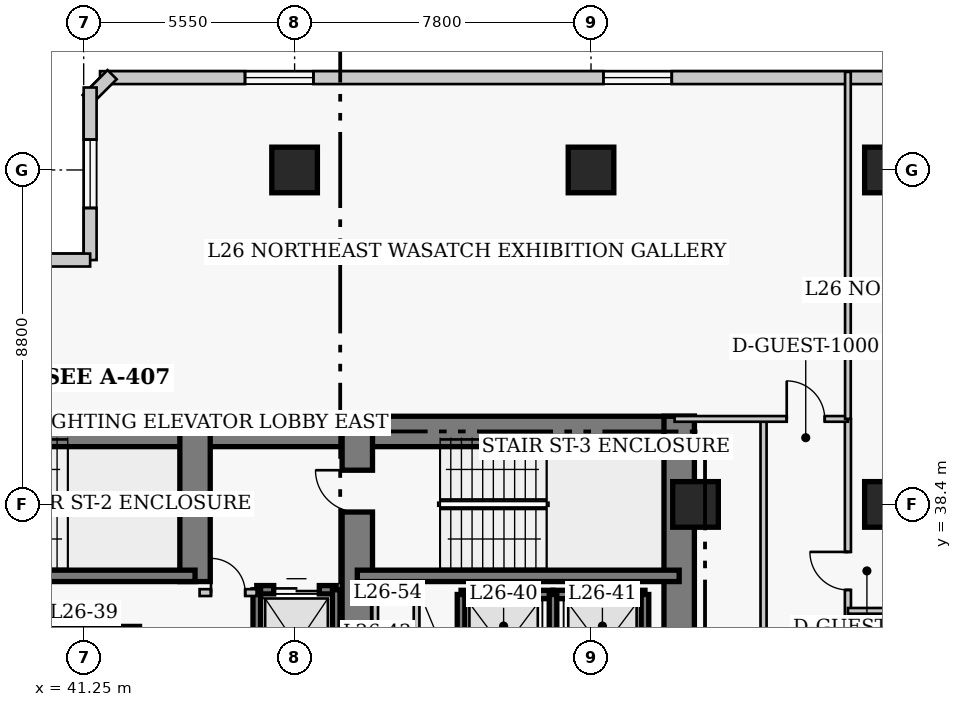
"""IFC4 building model, lengths in metres.
Left out: names, types, materials, properties, quantities, classifications, styles, units other than length and angle.
Written with IfcOpenShell. Run it as: python <this file> out.ifc"""

import sys

from ifc_helpers import new_model, si_unit, direction, frame, frame_2d, origin, origin_2d, place, context, subcontext, project, spatial, rectangle, extrude, element, fill, save


model = new_model("IFC4")
c1 = context("Model", 3, precision=1e-05, world=origin(), true_north=direction((0.0, 1.0)))
c2 = subcontext(c1, "Body", "Model", "MODEL_VIEW")
j1 = project(units=[si_unit("LENGTHUNIT", "METRE"), si_unit("PLANEANGLEUNIT", "RADIAN")], contexts=[c1])
p1 = place(None, origin())
s1 = spatial("IfcSite", under=j1, at=p1, CompositionType="ELEMENT")
p2 = place(p1, origin())
s2 = spatial("IfcBuilding", under=s1, at=p2, CompositionType="ELEMENT")
p3 = place(p2, frame((0.0, 0.0, 107.0)))
s3 = spatial("IfcBuildingStorey", under=s2, at=p3, CompositionType="ELEMENT", Elevation=107.0)
p4 = place(p3, frame((35.85, 40.32, 0.0), z_axis=(0.0, 0.0, 1.0), x_axis=(1.0, 0.0, 0.0)))
e1 = element("IfcWall", 1, at=p4, inside=s3, PredefinedType="SHEAR", context=c2, shape_type="SweptSolid", body=[
    extrude(rectangle(XDim=12.6, YDim=0.8, at=frame_2d((6.3, 0.0))), origin(), (0.0, 0.0, 1.0), 3.8),
])
p5 = place(p3, frame((48.45, 40.32, 0.0), z_axis=(0.0, 0.0, 1.0), x_axis=(1.0, 0.0, 0.0)))
e2 = element("IfcWall", 2, at=p5, inside=s3, PredefinedType="SHEAR", context=c2, shape_type="SweptSolid", body=[
    extrude(rectangle(XDim=8.87, YDim=0.8, at=frame_2d((4.435, 0.0))), origin(), (0.0, 0.0, 1.0), 3.8),
])
p6 = place(p3, frame((56.92, 27.05, 0.0), z_axis=(0.0, 0.0, 1.0), x_axis=(0.0, 1.0, 0.0)))
e3 = element("IfcWall", 3, at=p6, inside=s3, PredefinedType="SHEAR", context=c2, shape_type="SweptSolid", body=[
    extrude(rectangle(XDim=13.67, YDim=0.8, at=frame_2d((6.835, 0.0))), origin(), (0.0, 0.0, 1.0), 3.8),
])
p7 = place(p3, frame((44.18, 36.37, 0.0), z_axis=(0.0, 0.0, 1.0), x_axis=(0.0, 1.0, 0.0)))
e4 = element("IfcWall", 4, at=p7, inside=s3, PredefinedType="SHEAR", context=c2, shape_type="SweptSolid", body=[
    extrude(rectangle(XDim=3.95, YDim=0.8, at=frame_2d((1.975, 0.0))), origin(), (0.0, 0.0, 1.0), 3.8),
])
p8 = place(p3, frame((48.45, 32.35, 0.0), z_axis=(0.0, 0.0, 1.0), x_axis=(0.0, 1.0, 0.0)))
e5 = element("IfcWall", 5, at=p8, inside=s3, PredefinedType="SHEAR", context=c2, shape_type="SweptSolid", body=[
    extrude(rectangle(XDim=7.97, YDim=0.8, at=frame_2d((3.985, 0.0))), origin(), (0.0, 0.0, 1.0), 3.8),
])
p9 = place(p8, frame((5.85, 0.0, 0.0)))
e6 = element("IfcOpeningElement", 6, at=p9, cuts=e5, PredefinedType="OPENING", context=c2, shape_type="SweptSolid", body=[
    extrude(rectangle(XDim=1.1, YDim=2.15, at=frame_2d((0.55, 1.075))), frame((0.0, 0.41, 0.0), z_axis=(0.0, -1.0, 0.0), x_axis=(1.0, 0.0, 0.0)), (0.0, 0.0, 1.0), 0.82),
])
p10 = place(p3, frame((35.85, 36.52, 0.0), z_axis=(0.0, 0.0, 1.0), x_axis=(1.0, 0.0, 0.0)))
e7 = element("IfcWall", 7, at=p10, inside=s3, PredefinedType="SHEAR", context=c2, shape_type="SweptSolid", body=[
    extrude(rectangle(XDim=8.33, YDim=0.3, at=frame_2d((4.165, 0.0))), origin(), (0.0, 0.0, 1.0), 3.8),
])
p11 = place(p3, frame((48.45, 36.52, 0.0), z_axis=(0.0, 0.0, 1.0), x_axis=(1.0, 0.0, 0.0)))
e8 = element("IfcWall", 8, at=p11, inside=s3, PredefinedType="SHEAR", context=c2, shape_type="SweptSolid", body=[
    extrude(rectangle(XDim=8.47, YDim=0.3, at=frame_2d((4.235, 0.0))), origin(), (0.0, 0.0, 1.0), 3.8),
])
for number, where, z_axis, x_axis in (
    (9, (46.8, 47.2, 0.0), (0.0, 0.0, 1.0), (1.0, 0.0, 0.0)),
    (10, (54.6, 47.2, 0.0), (0.0, 0.0, 1.0), (1.0, 0.0, 0.0)),
    (11, (62.4, 38.4, 0.0), (0.0, 0.0, 1.0), (1.0, 0.0, 0.0)),
    (12, (62.4, 47.2, 0.0), (0.0, 0.0, 1.0), (1.0, 0.0, 0.0)),
    (13, (57.35, 38.4, 0.0), (0.0, 0.0, 1.0), (1.0, 0.0, 0.0)),
):
    element("IfcColumn", number, at=place(p3, frame(where, z_axis=z_axis, x_axis=x_axis)), inside=s3, PredefinedType="COLUMN", context=c2, shape_type="SweptSolid", body=[
        extrude(rectangle(XDim=1.2, YDim=1.2, at=origin_2d()), origin(), (0.0, 0.0, 1.0), 3.8),
    ])
p12 = place(p3, frame((69.97, 49.63, 0.0), z_axis=(0.0, 0.0, 1.0), x_axis=(-1.0, 0.0, 0.0)))
e14 = element("IfcWall", 14, at=p12, inside=s3, PredefinedType="SOLIDWALL", context=c2, shape_type="SweptSolid", body=[
    extrude(rectangle(XDim=28.29, YDim=0.34, at=frame_2d((14.145, 0.0))), origin(), (0.0, 0.0, 1.0), 3.54),
])
p13 = place(p12, frame((3.815, 0.0, 0.85)))
e15 = element("IfcOpeningElement", 15, at=p13, cuts=e14, PredefinedType="OPENING", context=c2, shape_type="SweptSolid", body=[
    extrude(rectangle(XDim=1.8, YDim=1.8, at=frame_2d((0.9, 0.9))), frame((0.0, 0.18, 0.0), z_axis=(0.0, -1.0, 0.0), x_axis=(1.0, 0.0, 0.0)), (0.0, 0.0, 1.0), 0.36),
])
p14 = place(p12, frame((13.245, 0.0, 0.85)))
e16 = element("IfcOpeningElement", 16, at=p14, cuts=e14, PredefinedType="OPENING", context=c2, shape_type="SweptSolid", body=[
    extrude(rectangle(XDim=1.8, YDim=1.8, at=frame_2d((0.9, 0.9))), frame((0.0, 0.18, 0.0), z_axis=(0.0, -1.0, 0.0), x_axis=(1.0, 0.0, 0.0)), (0.0, 0.0, 1.0), 0.36),
])
p15 = place(p12, frame((22.675, 0.0, 0.85)))
e17 = element("IfcOpeningElement", 17, at=p15, cuts=e14, PredefinedType="OPENING", context=c2, shape_type="SweptSolid", body=[
    extrude(rectangle(XDim=1.8, YDim=1.8, at=frame_2d((0.9, 0.9))), frame((0.0, 0.18, 0.0), z_axis=(0.0, -1.0, 0.0), x_axis=(1.0, 0.0, 0.0)), (0.0, 0.0, 1.0), 0.36),
])
p16 = place(p3, frame((41.999, 49.708, 0.0), z_axis=(0.0, 0.0, 1.0), x_axis=(-0.707238225886, -0.706975312048, 0.0)))
e18 = element("IfcWall", 18, at=p16, inside=s3, PredefinedType="SOLIDWALL", context=c2, shape_type="SweptSolid", body=[
    extrude(rectangle(XDim=0.929, YDim=0.34, at=frame_2d((0.464, 0.0))), origin(), (0.0, 0.0, 1.0), 3.54),
])
p17 = place(p3, frame((41.42, 49.37, 0.0), z_axis=(0.0, 0.0, 1.0), x_axis=(0.0, -1.0, 0.0)))
e19 = element("IfcWall", 19, at=p17, inside=s3, PredefinedType="SOLIDWALL", context=c2, shape_type="SweptSolid", body=[
    extrude(rectangle(XDim=4.54, YDim=0.34, at=frame_2d((2.27, 0.0))), origin(), (0.0, 0.0, 1.0), 3.54),
])
p18 = place(p17, frame((1.37, 0.0, 0.85)))
e20 = element("IfcOpeningElement", 20, at=p18, cuts=e19, PredefinedType="OPENING", context=c2, shape_type="SweptSolid", body=[
    extrude(rectangle(XDim=1.8, YDim=1.8, at=frame_2d((0.9, 0.9))), frame((0.0, 0.18, 0.0), z_axis=(0.0, -1.0, 0.0), x_axis=(1.0, 0.0, 0.0)), (0.0, 0.0, 1.0), 0.36),
])
p19 = place(p3, frame((41.42, 44.83, 0.0), z_axis=(0.0, 0.0, 1.0), x_axis=(-1.0, 0.0, 0.0)))
e21 = element("IfcWall", 21, at=p19, inside=s3, PredefinedType="SOLIDWALL", context=c2, shape_type="SweptSolid", body=[
    extrude(rectangle(XDim=4.84, YDim=0.34, at=frame_2d((2.42, 0.0))), origin(), (0.0, 0.0, 1.0), 3.54),
])
p20 = place(p19, frame((1.52, 0.0, 0.85)))
e22 = element("IfcOpeningElement", 22, at=p20, cuts=e21, PredefinedType="OPENING", context=c2, shape_type="SweptSolid", body=[
    extrude(rectangle(XDim=1.8, YDim=1.8, at=frame_2d((0.9, 0.9))), frame((0.0, 0.18, 0.0), z_axis=(0.0, -1.0, 0.0), x_axis=(1.0, 0.0, 0.0)), (0.0, 0.0, 1.0), 0.36),
])
p21 = place(p3, frame((40.4, 35.08, 0.0), z_axis=(0.0, 0.0, 1.0), x_axis=(1.0, 0.0, 0.0)))
e23 = element("IfcWall", 23, at=p21, inside=s3, PredefinedType="SHEAR", context=c2, shape_type="SweptSolid", body=[
    extrude(rectangle(XDim=2.32, YDim=0.22, at=frame_2d((1.16, 0.0))), origin(), (0.0, 0.0, 1.0), 3.8),
])
p22 = place(p3, frame((51.18, 36.03, 0.0), z_axis=(0.0, 0.0, 1.0), x_axis=(1.0, 0.0, 0.0)))
e24 = element("IfcWall", 24, at=p22, inside=s3, PredefinedType="SHEAR", context=c2, shape_type="SweptSolid", body=[
    extrude(rectangle(XDim=2.42, YDim=0.22, at=frame_2d((1.21, 0.0))), origin(), (0.0, 0.0, 1.0), 3.8),
])
p23 = place(p3, frame((51.18, 33.17, 0.0), z_axis=(0.0, 0.0, 1.0), x_axis=(0.0, 1.0, 0.0)))
e25 = element("IfcWall", 25, at=p23, inside=s3, PredefinedType="SHEAR", context=c2, shape_type="SweptSolid", body=[
    extrude(rectangle(XDim=2.86, YDim=0.2, at=frame_2d((1.43, 0.0))), origin(), (0.0, 0.0, 1.0), 3.8),
])
p24 = place(p3, frame((53.6, 36.03, 0.0), z_axis=(0.0, 0.0, 1.0), x_axis=(1.0, 0.0, 0.0)))
e26 = element("IfcWall", 26, at=p24, inside=s3, PredefinedType="SHEAR", context=c2, shape_type="SweptSolid", body=[
    extrude(rectangle(XDim=2.42, YDim=0.22, at=frame_2d((1.21, 0.0))), origin(), (0.0, 0.0, 1.0), 3.8),
])
for number, where, z_axis, x_axis in (
    (27, (53.6, 33.17, 0.0), (0.0, 0.0, 1.0), (0.0, 1.0, 0.0)),
    (28, (56.02, 33.17, 0.0), (0.0, 0.0, 1.0), (0.0, 1.0, 0.0)),
):
    element("IfcWall", number, at=place(p3, frame(where, z_axis=z_axis, x_axis=x_axis)), inside=s3, PredefinedType="SHEAR", context=c2, shape_type="SweptSolid", body=[
        extrude(rectangle(XDim=2.86, YDim=0.2, at=frame_2d((1.43, 0.0))), origin(), (0.0, 0.0, 1.0), 3.8),
    ])
p25 = place(p3, frame((45.805, 36.155, 0.0), z_axis=(0.0, 0.0, 1.0), x_axis=(1.0, 0.0, 0.0)))
e29 = element("IfcWall", 29, at=p25, inside=s3, PredefinedType="SHEAR", context=c2, shape_type="SweptSolid", body=[
    extrude(rectangle(XDim=2.09, YDim=0.22, at=frame_2d((1.045, 0.0))), origin(), (0.0, 0.0, 1.0), 3.8),
])
p26 = place(p25, frame((0.445, 0.0, 0.0)))
e30 = element("IfcOpeningElement", 30, at=p26, cuts=e29, PredefinedType="OPENING", context=c2, shape_type="SweptSolid", body=[
    extrude(rectangle(XDim=1.2, YDim=2.15, at=frame_2d((0.6, 1.075))), frame((0.0, 0.12, 0.0), z_axis=(0.0, -1.0, 0.0), x_axis=(1.0, 0.0, 0.0)), (0.0, 0.0, 1.0), 0.24),
])
p27 = place(p3, frame((45.805, 32.65, 0.0), z_axis=(0.0, 0.0, 1.0), x_axis=(0.0, 1.0, 0.0)))
e31 = element("IfcWall", 31, at=p27, inside=s3, PredefinedType="SHEAR", context=c2, shape_type="SweptSolid", body=[
    extrude(rectangle(XDim=3.505, YDim=0.2, at=frame_2d((1.752, 0.0))), origin(), (0.0, 0.0, 1.0), 3.8),
])
p28 = place(p3, frame((47.895, 33.245, 0.0), z_axis=(0.0, 0.0, 1.0), x_axis=(0.0, 1.0, 0.0)))
e32 = element("IfcWall", 32, at=p28, inside=s3, PredefinedType="SHEAR", context=c2, shape_type="SweptSolid", body=[
    extrude(rectangle(XDim=2.91, YDim=0.2, at=frame_2d((1.455, 0.0))), origin(), (0.0, 0.0, 1.0), 3.8),
])
p29 = place(p3, frame((44.3, 36.08, 0.0), z_axis=(0.0, 0.0, 1.0), x_axis=(1.0, 0.0, 0.0)))
e33 = element("IfcWall", 33, at=p29, inside=s3, PredefinedType="PARTITIONING", context=c2, shape_type="SweptSolid", body=[
    extrude(rectangle(XDim=1.5, YDim=0.18, at=frame_2d((0.75, 0.0))), origin(), (0.0, 0.0, 1.0), 3.54),
])
p30 = place(p29, frame((0.3, 0.0, 0.0)))
e34 = element("IfcOpeningElement", 34, at=p30, cuts=e33, PredefinedType="OPENING", context=c2, shape_type="SweptSolid", body=[
    extrude(rectangle(XDim=0.9, YDim=2.15, at=frame_2d((0.45, 1.075))), frame((0.0, 0.1, 0.0), z_axis=(0.0, -1.0, 0.0), x_axis=(1.0, 0.0, 0.0)), (0.0, 0.0, 1.0), 0.2),
])
for number, where, z_axis, x_axis in (
    (35, (48.92, 32.75, 0.0), (0.0, 0.0, 1.0), (0.0, 1.0, 0.0)),
    (36, (50.01, 32.75, 0.0), (0.0, 0.0, 1.0), (0.0, 1.0, 0.0)),
):
    element("IfcWall", number, at=place(p3, frame(where, z_axis=z_axis, x_axis=x_axis)), inside=s3, PredefinedType="PARTITIONING", context=c2, shape_type="SweptSolid", body=[
        extrude(rectangle(XDim=3.62, YDim=0.15, at=frame_2d((1.81, 0.0))), origin(), (0.0, 0.0, 1.0), 3.54),
    ])
p31 = place(p3, frame((61.36, 11.85, 0.0), z_axis=(0.0, 0.0, 1.0), x_axis=(0.0, 1.0, 0.0)))
e37 = element("IfcWall", 37, at=p31, inside=s3, PredefinedType="PARTITIONING", context=c2, shape_type="SweptSolid", body=[
    extrude(rectangle(XDim=28.8, YDim=0.16, at=frame_2d((14.4, 0.0))), origin(), (0.0, 0.0, 1.0), 3.54),
])
p32 = place(p31, frame((3.6, 0.0, 0.0)))
e38 = element("IfcOpeningElement", 38, at=p32, cuts=e37, PredefinedType="OPENING", context=c2, shape_type="SweptSolid", body=[
    extrude(rectangle(XDim=0.95, YDim=2.1, at=frame_2d((0.475, 1.05))), frame((0.0, 0.09, 0.0), z_axis=(0.0, -1.0, 0.0), x_axis=(1.0, 0.0, 0.0)), (0.0, 0.0, 1.0), 0.18),
])
p33 = place(p31, frame((12.075, 0.0, 0.0)))
e39 = element("IfcOpeningElement", 39, at=p33, cuts=e37, PredefinedType="OPENING", context=c2, shape_type="SweptSolid", body=[
    extrude(rectangle(XDim=0.95, YDim=2.1, at=frame_2d((0.475, 1.05))), frame((0.0, 0.09, 0.0), z_axis=(0.0, -1.0, 0.0), x_axis=(1.0, 0.0, 0.0)), (0.0, 0.0, 1.0), 0.18),
])
p34 = place(p31, frame((19.875, 0.0, 0.0)))
e40 = element("IfcOpeningElement", 40, at=p34, cuts=e37, PredefinedType="OPENING", context=c2, shape_type="SweptSolid", body=[
    extrude(rectangle(XDim=0.95, YDim=2.1, at=frame_2d((0.475, 1.05))), frame((0.0, 0.09, 0.0), z_axis=(0.0, -1.0, 0.0), x_axis=(1.0, 0.0, 0.0)), (0.0, 0.0, 1.0), 0.18),
])
p35 = place(p31, frame((24.3, 0.0, 0.0)))
e41 = element("IfcOpeningElement", 41, at=p35, cuts=e37, PredefinedType="OPENING", context=c2, shape_type="SweptSolid", body=[
    extrude(rectangle(XDim=1.0, YDim=2.15, at=frame_2d((0.5, 1.075))), frame((0.0, 0.09, 0.0), z_axis=(0.0, -1.0, 0.0), x_axis=(1.0, 0.0, 0.0)), (0.0, 0.0, 1.0), 0.18),
])
p36 = place(p3, frame((59.14, 24.66, 0.0), z_axis=(0.0, 0.0, 1.0), x_axis=(0.0, 1.0, 0.0)))
e42 = element("IfcWall", 42, at=p36, inside=s3, PredefinedType="PARTITIONING", context=c2, shape_type="SweptSolid", body=[
    extrude(rectangle(XDim=15.99, YDim=0.16, at=frame_2d((7.995, 0.0))), origin(), (0.0, 0.0, 1.0), 3.54),
])
p37 = place(p3, frame((56.8, 40.65, 0.0), z_axis=(0.0, 0.0, 1.0), x_axis=(1.0, 0.0, 0.0)))
e43 = element("IfcWall", 43, at=p37, inside=s3, PredefinedType="PARTITIONING", context=c2, shape_type="SweptSolid", body=[
    extrude(rectangle(XDim=4.56, YDim=0.15, at=frame_2d((2.28, 0.0))), origin(), (0.0, 0.0, 1.0), 3.54),
])
p38 = place(p37, frame((2.95, 0.0, 0.0)))
e44 = element("IfcOpeningElement", 44, at=p38, cuts=e43, PredefinedType="OPENING", context=c2, shape_type="SweptSolid", body=[
    extrude(rectangle(XDim=1.0, YDim=2.15, at=frame_2d((0.5, 1.075))), frame((0.0, 0.085, 0.0), z_axis=(0.0, -1.0, 0.0), x_axis=(1.0, 0.0, 0.0)), (0.0, 0.0, 1.0), 0.17),
])
p39 = place(p3, frame((61.36, 40.65, 0.0), z_axis=(0.0, 0.0, 1.0), x_axis=(0.0, 1.0, 0.0)))
e45 = element("IfcWall", 45, at=p39, inside=s3, PredefinedType="PARTITIONING", context=c2, shape_type="SweptSolid", body=[
    extrude(rectangle(XDim=9.13, YDim=0.15, at=frame_2d((4.565, 0.0))), origin(), (0.0, 0.0, 1.0), 3.54),
])
p40 = place(p3, frame((61.36, 35.6, 0.0), z_axis=(0.0, 0.0, 1.0), x_axis=(1.0, 0.0, 0.0)))
e46 = element("IfcWall", 46, at=p40, inside=s3, PredefinedType="PARTITIONING", context=c2, shape_type="SweptSolid", body=[
    extrude(rectangle(XDim=3.74, YDim=0.15, at=frame_2d((1.87, 0.0))), origin(), (0.0, 0.0, 1.0), 3.54),
])
p41 = place(p14, origin())
e47 = element("IfcWindow", 47, at=p41, inside=s3, PartitioningType="SINGLE_PANEL", PredefinedType="WINDOW", context=c2, shape_type="SweptSolid", body=[
    extrude(rectangle(XDim=1.8, YDim=1.8, at=frame_2d((0.9, 0.9))), frame((0.0, 0.03, 0.0), z_axis=(0.0, -1.0, 0.0), x_axis=(1.0, 0.0, 0.0)), (0.0, 0.0, 1.0), 0.06),
])
fill(e16, e47)
p42 = place(p15, origin())
e48 = element("IfcWindow", 48, at=p42, inside=s3, PartitioningType="SINGLE_PANEL", PredefinedType="WINDOW", context=c2, shape_type="SweptSolid", body=[
    extrude(rectangle(XDim=1.8, YDim=1.8, at=frame_2d((0.9, 0.9))), frame((0.0, 0.03, 0.0), z_axis=(0.0, -1.0, 0.0), x_axis=(1.0, 0.0, 0.0)), (0.0, 0.0, 1.0), 0.06),
])
fill(e17, e48)
p43 = place(p18, origin())
e49 = element("IfcWindow", 49, at=p43, inside=s3, PartitioningType="SINGLE_PANEL", PredefinedType="WINDOW", context=c2, shape_type="SweptSolid", body=[
    extrude(rectangle(XDim=1.8, YDim=1.8, at=frame_2d((0.9, 0.9))), frame((0.0, 0.03, 0.0), z_axis=(0.0, -1.0, 0.0), x_axis=(1.0, 0.0, 0.0)), (0.0, 0.0, 1.0), 0.06),
])
fill(e20, e49)
p44 = place(p26, origin())
e50 = element("IfcDoor", 50, at=p44, inside=s3, OperationType="DOUBLE_DOOR_SLIDING", PredefinedType="DOOR", context=c2, shape_type="SweptSolid", body=[
    extrude(rectangle(XDim=1.2, YDim=2.15, at=frame_2d((0.6, 1.075))), frame((0.0, 0.025, 0.0), z_axis=(0.0, -1.0, 0.0), x_axis=(1.0, 0.0, 0.0)), (0.0, 0.0, 1.0), 0.05),
])
fill(e30, e50)
p45 = place(p30, origin())
e51 = element("IfcDoor", 51, at=p45, inside=s3, OperationType="SINGLE_SWING_LEFT", PredefinedType="DOOR", context=c2, shape_type="SweptSolid", body=[
    extrude(rectangle(XDim=0.9, YDim=2.15, at=frame_2d((0.45, 1.075))), frame((0.0, 0.025, 0.0), z_axis=(0.0, -1.0, 0.0), x_axis=(1.0, 0.0, 0.0)), (0.0, 0.0, 1.0), 0.05),
])
fill(e34, e51)
p46 = place(p38, origin())
e52 = element("IfcDoor", 52, at=p46, inside=s3, OperationType="SINGLE_SWING_LEFT", PredefinedType="DOOR", context=c2, shape_type="SweptSolid", body=[
    extrude(rectangle(XDim=1.0, YDim=2.15, at=frame_2d((0.5, 1.075))), frame((0.0, 0.025, 0.0), z_axis=(0.0, -1.0, 0.0), x_axis=(1.0, 0.0, 0.0)), (0.0, 0.0, 1.0), 0.05),
])
fill(e44, e52)
p47 = place(p35, origin())
e53 = element("IfcDoor", 53, at=p47, inside=s3, OperationType="SINGLE_SWING_RIGHT", PredefinedType="DOOR", context=c2, shape_type="SweptSolid", body=[
    extrude(rectangle(XDim=1.0, YDim=2.15, at=frame_2d((0.5, 1.075))), frame((0.0, 0.025, 0.0), z_axis=(0.0, -1.0, 0.0), x_axis=(1.0, 0.0, 0.0)), (0.0, 0.0, 1.0), 0.05),
])
fill(e41, e53)
p48 = place(p9, origin())
e54 = element("IfcDoor", 54, at=p48, inside=s3, OperationType="SINGLE_SWING_RIGHT", PredefinedType="DOOR", context=c2, shape_type="SweptSolid", body=[
    extrude(rectangle(XDim=1.1, YDim=2.15, at=frame_2d((0.55, 1.075))), frame((0.0, 0.025, 0.0), z_axis=(0.0, -1.0, 0.0), x_axis=(1.0, 0.0, 0.0)), (0.0, 0.0, 1.0), 0.05),
])
fill(e6, e54)
save(model, sys.argv[1])
